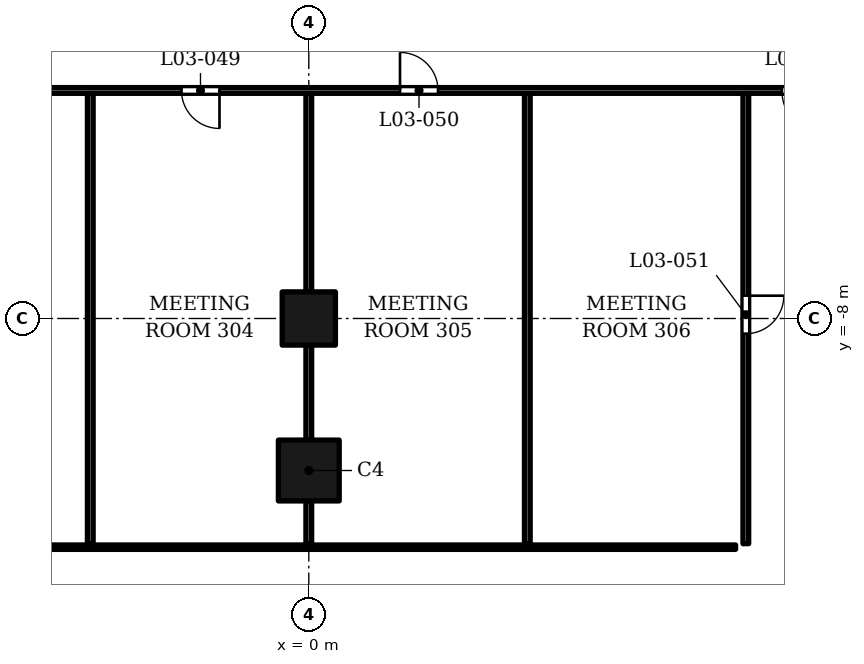
"""IFC4 building model, lengths in metres.
Left out: names, types, materials, properties, quantities, classifications, styles, units other than length and angle.
Written with IfcOpenShell. Run it as: python <this file> out.ifc"""

import sys

from ifc_helpers import new_model, si_unit, direction, frame, frame_2d, origin, origin_2d, place, context, subcontext, project, spatial, rectangle, extrude, element, fill, save


model = new_model("IFC4")
c1 = context("Model", 3, precision=1e-05, world=origin(), true_north=direction((0.0, 1.0)))
c2 = subcontext(c1, "Body", "Model", "MODEL_VIEW")
j1 = project(units=[si_unit("LENGTHUNIT", "METRE"), si_unit("PLANEANGLEUNIT", "RADIAN")], contexts=[c1])
p1 = place(None, origin())
s1 = spatial("IfcSite", under=j1, at=p1, CompositionType="ELEMENT")
p2 = place(p1, origin())
s2 = spatial("IfcBuilding", under=s1, at=p2, CompositionType="ELEMENT")
p3 = place(p2, frame((0.0, 0.0, 29.0)))
s3 = spatial("IfcBuildingStorey", under=s2, at=p3, CompositionType="ELEMENT", Elevation=29.0)
p4 = place(p3, frame((0.0, -8.0, 0.0), z_axis=(0.0, 0.0, 1.0), x_axis=(1.0, 0.0, 0.0)))
e1 = element("IfcColumn", 1, at=p4, inside=s3, PredefinedType="COLUMN", context=c2, shape_type="SweptSolid", body=[
    extrude(rectangle(XDim=1.4, YDim=1.4, at=origin_2d()), origin(), (0.0, 0.0, 1.0), 5.5),
])
p5 = place(p3, frame((0.0, -12.0, 0.0), z_axis=(0.0, 0.0, 1.0), x_axis=(1.0, 0.0, 0.0)))
e2 = element("IfcColumn", 2, at=p5, inside=s3, PredefinedType="COLUMN", context=c2, shape_type="SweptSolid", body=[
    extrude(rectangle(XDim=1.6, YDim=1.6, at=origin_2d()), origin(), (0.0, 0.0, 1.0), 5.5),
])
p6 = place(p3, frame((-11.23, -14.018, 0.0), z_axis=(0.0, 0.0, 1.0), x_axis=(1.0, 0.0, 0.0)))
e3 = element("IfcWall", 3, at=p6, inside=s3, PredefinedType="PARTITIONING", context=c2, shape_type="SweptSolid", body=[
    extrude(rectangle(XDim=22.46, YDim=0.115, at=frame_2d((11.23, 0.0))), origin(), (0.0, 0.0, 1.0), 3.85),
])
p7 = place(p3, frame((-5.75, -13.925, 0.0), z_axis=(0.0, 0.0, 1.0), x_axis=(0.0, 1.0, 0.0)))
e4 = element("IfcWall", 4, at=p7, inside=s3, PredefinedType="PARTITIONING", context=c2, shape_type="SweptSolid", body=[
    extrude(rectangle(XDim=11.85, YDim=0.15, at=frame_2d((5.925, 0.0))), origin(), (0.0, 0.0, 1.0), 3.85),
])
p8 = place(p3, frame((0.0, -13.925, 0.0), z_axis=(0.0, 0.0, 1.0), x_axis=(0.0, 1.0, 0.0)))
e5 = element("IfcWall", 5, at=p8, inside=s3, PredefinedType="PARTITIONING", context=c2, shape_type="SweptSolid", body=[
    extrude(rectangle(XDim=1.125, YDim=0.15, at=frame_2d((0.562, 0.0))), origin(), (0.0, 0.0, 1.0), 3.85),
])
p9 = place(p3, frame((5.75, -13.925, 0.0), z_axis=(0.0, 0.0, 1.0), x_axis=(0.0, 1.0, 0.0)))
e6 = element("IfcWall", 6, at=p9, inside=s3, PredefinedType="PARTITIONING", context=c2, shape_type="SweptSolid", body=[
    extrude(rectangle(XDim=11.85, YDim=0.15, at=frame_2d((5.925, 0.0))), origin(), (0.0, 0.0, 1.0), 3.85),
])
p10 = place(p3, frame((11.5, -13.925, 0.0), z_axis=(0.0, 0.0, 1.0), x_axis=(0.0, 1.0, 0.0)))
e7 = element("IfcWall", 7, at=p10, inside=s3, PredefinedType="PARTITIONING", context=c2, shape_type="SweptSolid", body=[
    extrude(rectangle(XDim=11.85, YDim=0.15, at=frame_2d((5.925, 0.0))), origin(), (0.0, 0.0, 1.0), 3.85),
])
p11 = place(p10, frame((5.525, 0.0, 0.0)))
e8 = element("IfcOpeningElement", 8, at=p11, cuts=e7, PredefinedType="OPENING", context=c2, shape_type="SweptSolid", body=[
    extrude(rectangle(XDim=1.0, YDim=2.1, at=frame_2d((0.5, 1.05))), frame((0.0, 0.085, 0.0), z_axis=(0.0, -1.0, 0.0), x_axis=(1.0, 0.0, 0.0)), (0.0, 0.0, 1.0), 0.17),
])
p12 = place(p3, frame((0.0, -11.2, 0.0), z_axis=(0.0, 0.0, 1.0), x_axis=(0.0, 1.0, 0.0)))
e9 = element("IfcWall", 9, at=p12, inside=s3, PredefinedType="PARTITIONING", context=c2, shape_type="SweptSolid", body=[
    extrude(rectangle(XDim=2.5, YDim=0.15, at=frame_2d((1.25, 0.0))), origin(), (0.0, 0.0, 1.0), 3.85),
])
p13 = place(p3, frame((0.0, -7.3, 0.0), z_axis=(0.0, 0.0, 1.0), x_axis=(0.0, 1.0, 0.0)))
e10 = element("IfcWall", 10, at=p13, inside=s3, PredefinedType="PARTITIONING", context=c2, shape_type="SweptSolid", body=[
    extrude(rectangle(XDim=5.225, YDim=0.15, at=frame_2d((2.613, 0.0))), origin(), (0.0, 0.0, 1.0), 5.05),
])
p14 = place(p3, frame((-33.46, -2.0, 0.0), z_axis=(0.0, 0.0, 1.0), x_axis=(1.0, 0.0, 0.0)))
e11 = element("IfcWall", 11, at=p14, inside=s3, PredefinedType="PARTITIONING", context=c2, shape_type="SweptSolid", body=[
    extrude(rectangle(XDim=66.92, YDim=0.15, at=frame_2d((33.46, 0.0))), origin(), (0.0, 0.0, 1.0), 3.85),
])
p15 = place(p14, frame((19.91, 0.0, 0.0)))
e12 = element("IfcOpeningElement", 12, at=p15, cuts=e11, PredefinedType="OPENING", context=c2, shape_type="SweptSolid", body=[
    extrude(rectangle(XDim=1.2, YDim=2.1, at=frame_2d((0.6, 1.05))), frame((0.0, 0.085, 0.0), z_axis=(0.0, -1.0, 0.0), x_axis=(1.0, 0.0, 0.0)), (0.0, 0.0, 1.0), 0.17),
])
p16 = place(p14, frame((45.91, 0.0, 0.0)))
e13 = element("IfcOpeningElement", 13, at=p16, cuts=e11, PredefinedType="OPENING", context=c2, shape_type="SweptSolid", body=[
    extrude(rectangle(XDim=1.2, YDim=2.1, at=frame_2d((0.6, 1.05))), frame((0.0, 0.085, 0.0), z_axis=(0.0, -1.0, 0.0), x_axis=(1.0, 0.0, 0.0)), (0.0, 0.0, 1.0), 0.17),
])
p17 = place(p14, frame((30.11, 0.0, 0.0)))
e14 = element("IfcOpeningElement", 14, at=p17, cuts=e11, PredefinedType="OPENING", context=c2, shape_type="SweptSolid", body=[
    extrude(rectangle(XDim=1.0, YDim=2.1, at=frame_2d((0.5, 1.05))), frame((0.0, 0.085, 0.0), z_axis=(0.0, -1.0, 0.0), x_axis=(1.0, 0.0, 0.0)), (0.0, 0.0, 1.0), 0.17),
])
p18 = place(p14, frame((35.86, 0.0, 0.0)))
e15 = element("IfcOpeningElement", 15, at=p18, cuts=e11, PredefinedType="OPENING", context=c2, shape_type="SweptSolid", body=[
    extrude(rectangle(XDim=1.0, YDim=2.1, at=frame_2d((0.5, 1.05))), frame((0.0, 0.085, 0.0), z_axis=(0.0, -1.0, 0.0), x_axis=(1.0, 0.0, 0.0)), (0.0, 0.0, 1.0), 0.17),
])
p19 = place(p16, origin())
e16 = element("IfcDoor", 16, at=p19, inside=s3, OperationType="SINGLE_SWING_RIGHT", PredefinedType="DOOR", context=c2, shape_type="SweptSolid", body=[
    extrude(rectangle(XDim=1.2, YDim=2.1, at=frame_2d((0.6, 1.05))), frame((0.0, 0.025, 0.0), z_axis=(0.0, -1.0, 0.0), x_axis=(1.0, 0.0, 0.0)), (0.0, 0.0, 1.0), 0.05),
])
fill(e13, e16)
p20 = place(p17, origin())
e17 = element("IfcDoor", 17, at=p20, inside=s3, OperationType="SINGLE_SWING_RIGHT", PredefinedType="DOOR", context=c2, shape_type="SweptSolid", body=[
    extrude(rectangle(XDim=1.0, YDim=2.1, at=frame_2d((0.5, 1.05))), frame((0.0, 0.025, 0.0), z_axis=(0.0, -1.0, 0.0), x_axis=(1.0, 0.0, 0.0)), (0.0, 0.0, 1.0), 0.05),
])
fill(e14, e17)
p21 = place(p18, origin())
e18 = element("IfcDoor", 18, at=p21, inside=s3, OperationType="SINGLE_SWING_LEFT", PredefinedType="DOOR", context=c2, shape_type="SweptSolid", body=[
    extrude(rectangle(XDim=1.0, YDim=2.1, at=frame_2d((0.5, 1.05))), frame((0.0, 0.025, 0.0), z_axis=(0.0, -1.0, 0.0), x_axis=(1.0, 0.0, 0.0)), (0.0, 0.0, 1.0), 0.05),
])
fill(e15, e18)
p22 = place(p11, origin())
e19 = element("IfcDoor", 19, at=p22, inside=s3, OperationType="SINGLE_SWING_RIGHT", PredefinedType="DOOR", context=c2, shape_type="SweptSolid", body=[
    extrude(rectangle(XDim=1.0, YDim=2.1, at=frame_2d((0.5, 1.05))), frame((0.0, 0.025, 0.0), z_axis=(0.0, -1.0, 0.0), x_axis=(1.0, 0.0, 0.0)), (0.0, 0.0, 1.0), 0.05),
])
fill(e8, e19)
save(model, sys.argv[1])
